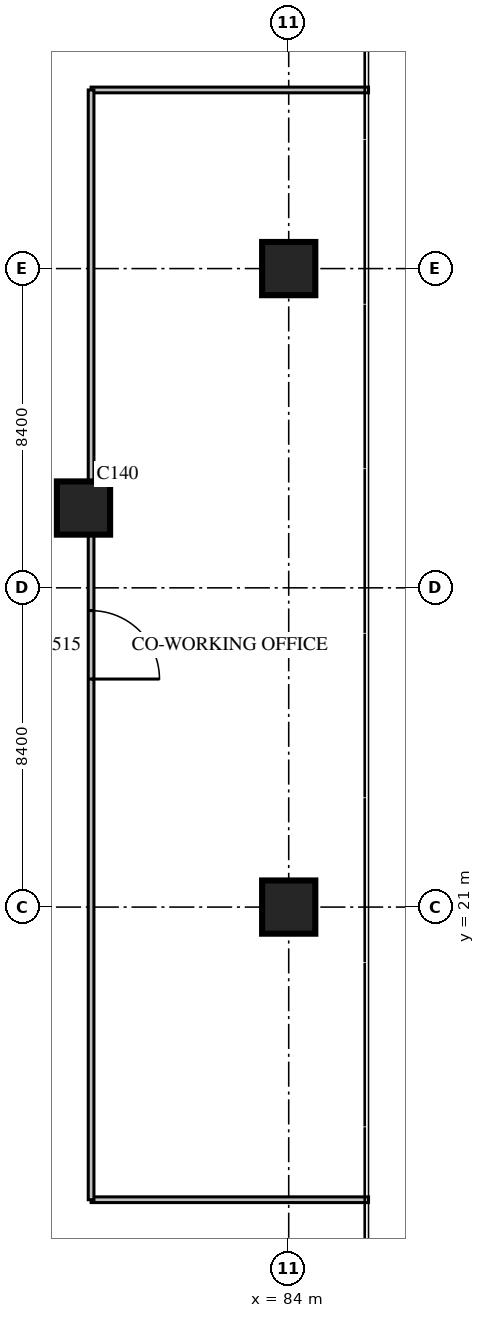
"""IFC4 building model, lengths in metres.
Left out: names, types, materials, properties, quantities, classifications, styles, units other than length and angle.
Written with IfcOpenShell. Run it as: python <this file> out.ifc"""

import sys

from ifc_helpers import new_model, si_unit, direction, frame, frame_2d, origin, origin_2d, place, context, subcontext, project, spatial, rectangle, extrude, source, transform, mapped, element, fill, save


model = new_model("IFC4")
c1 = context("Model", 3, precision=1e-05, world=origin(), true_north=direction((0.0, 1.0)))
c2 = subcontext(c1, "Body", "Model", "MODEL_VIEW")
j1 = project(units=[si_unit("LENGTHUNIT", "METRE"), si_unit("PLANEANGLEUNIT", "RADIAN")], contexts=[c1])
p1 = place(None, origin())
s1 = spatial("IfcSite", under=j1, at=p1, CompositionType="ELEMENT")
p2 = place(p1, origin())
s2 = spatial("IfcBuilding", under=s1, at=p2, CompositionType="ELEMENT")
p3 = place(p2, frame((0.0, 0.0, 12.9)))
s3 = spatial("IfcBuildingStorey", under=s2, at=p3, CompositionType="ELEMENT", Elevation=12.9)
m1 = source(origin(), c2, "Body", "SweptSolid", [
    extrude(rectangle(XDim=1.4, YDim=1.4, at=origin_2d()), origin(), (0.0, 0.0, 1.0), 5.4),
])
for number, where, z_axis, x_axis in (
    (1, (78.6, 31.5, 0.0), (0.0, 0.0, 1.0), (1.0, 0.0, 0.0)),
    (2, (84.0, 21.0, 0.0), (0.0, 0.0, 1.0), (1.0, 0.0, 0.0)),
    (3, (84.0, 37.8, 0.0), (0.0, 0.0, 1.0), (1.0, 0.0, 0.0)),
):
    element("IfcColumn", number, at=place(p3, frame(where, z_axis=z_axis, x_axis=x_axis)), inside=s3, PredefinedType="COLUMN", context=c2, shape_type="MappedRepresentation", body=[
        mapped(m1, transform((0.0, 0.0, 0.0), scale=1.0)),
    ])
m2 = source(origin(), c2, "Body", "SweptSolid", [
    extrude(rectangle(XDim=7.3, YDim=0.15, at=frame_2d((3.65, 0.0))), origin(), (0.0, 0.0, 1.0), 4.8),
])
for number, where, z_axis, x_axis in (
    (4, (78.8, 13.3, 0.0), (0.0, 0.0, 1.0), (1.0, 0.0, 0.0)),
    (5, (78.8, 42.5, 0.0), (0.0, 0.0, 1.0), (1.0, 0.0, 0.0)),
):
    element("IfcWall", number, at=place(p3, frame(where, z_axis=z_axis, x_axis=x_axis)), inside=s3, PredefinedType="PARTITIONING", context=c2, shape_type="MappedRepresentation", body=[
        mapped(m2, transform((0.0, 0.0, 0.0), scale=1.0)),
    ])
m3 = source(origin(), c2, "Body", "SweptSolid", [
    extrude(rectangle(XDim=29.2, YDim=0.15, at=frame_2d((14.6, 0.0))), origin(), (0.0, 0.0, 1.0), 4.8),
])
p4 = place(p3, frame((78.8, 13.3, 0.0), z_axis=(0.0, 0.0, 1.0), x_axis=(0.0, 1.0, 0.0)))
e6 = element("IfcWall", 6, at=p4, inside=s3, PredefinedType="PARTITIONING", context=c2, shape_type="MappedRepresentation", body=[
    mapped(m3, transform((0.0, 0.0, 0.0), scale=1.0)),
])
m4 = source(origin(), c2, "Body", "SweptSolid", [
    extrude(rectangle(XDim=1.8, YDim=2.1, at=frame_2d((0.9, 1.05))), frame((0.0, 0.085, 0.0), z_axis=(0.0, -1.0, 0.0), x_axis=(1.0, 0.0, 0.0)), (0.0, 0.0, 1.0), 0.17),
])
p5 = place(p4, frame((13.7, 0.0, 0.0)))
e7 = element("IfcOpeningElement", 7, at=p5, cuts=e6, PredefinedType="OPENING", context=c2, shape_type="MappedRepresentation", body=[
    mapped(m4, transform((0.0, 0.0, 0.0), scale=1.0)),
])
m5 = source(origin(), c2, "Body", "SweptSolid", [
    extrude(rectangle(XDim=1.8, YDim=2.1, at=frame_2d((0.9, 1.05))), frame((0.0, 0.025, 0.0), z_axis=(0.0, -1.0, 0.0), x_axis=(1.0, 0.0, 0.0)), (0.0, 0.0, 1.0), 0.05),
])
p6 = place(p5, origin())
e8 = element("IfcDoor", 8, at=p6, inside=s3, OperationType="DOUBLE_DOOR_SINGLE_SWING", PredefinedType="DOOR", context=c2, shape_type="MappedRepresentation", body=[
    mapped(m5, transform((0.0, 0.0, 0.0), scale=1.0)),
])
fill(e7, e8)
save(model, sys.argv[1])
